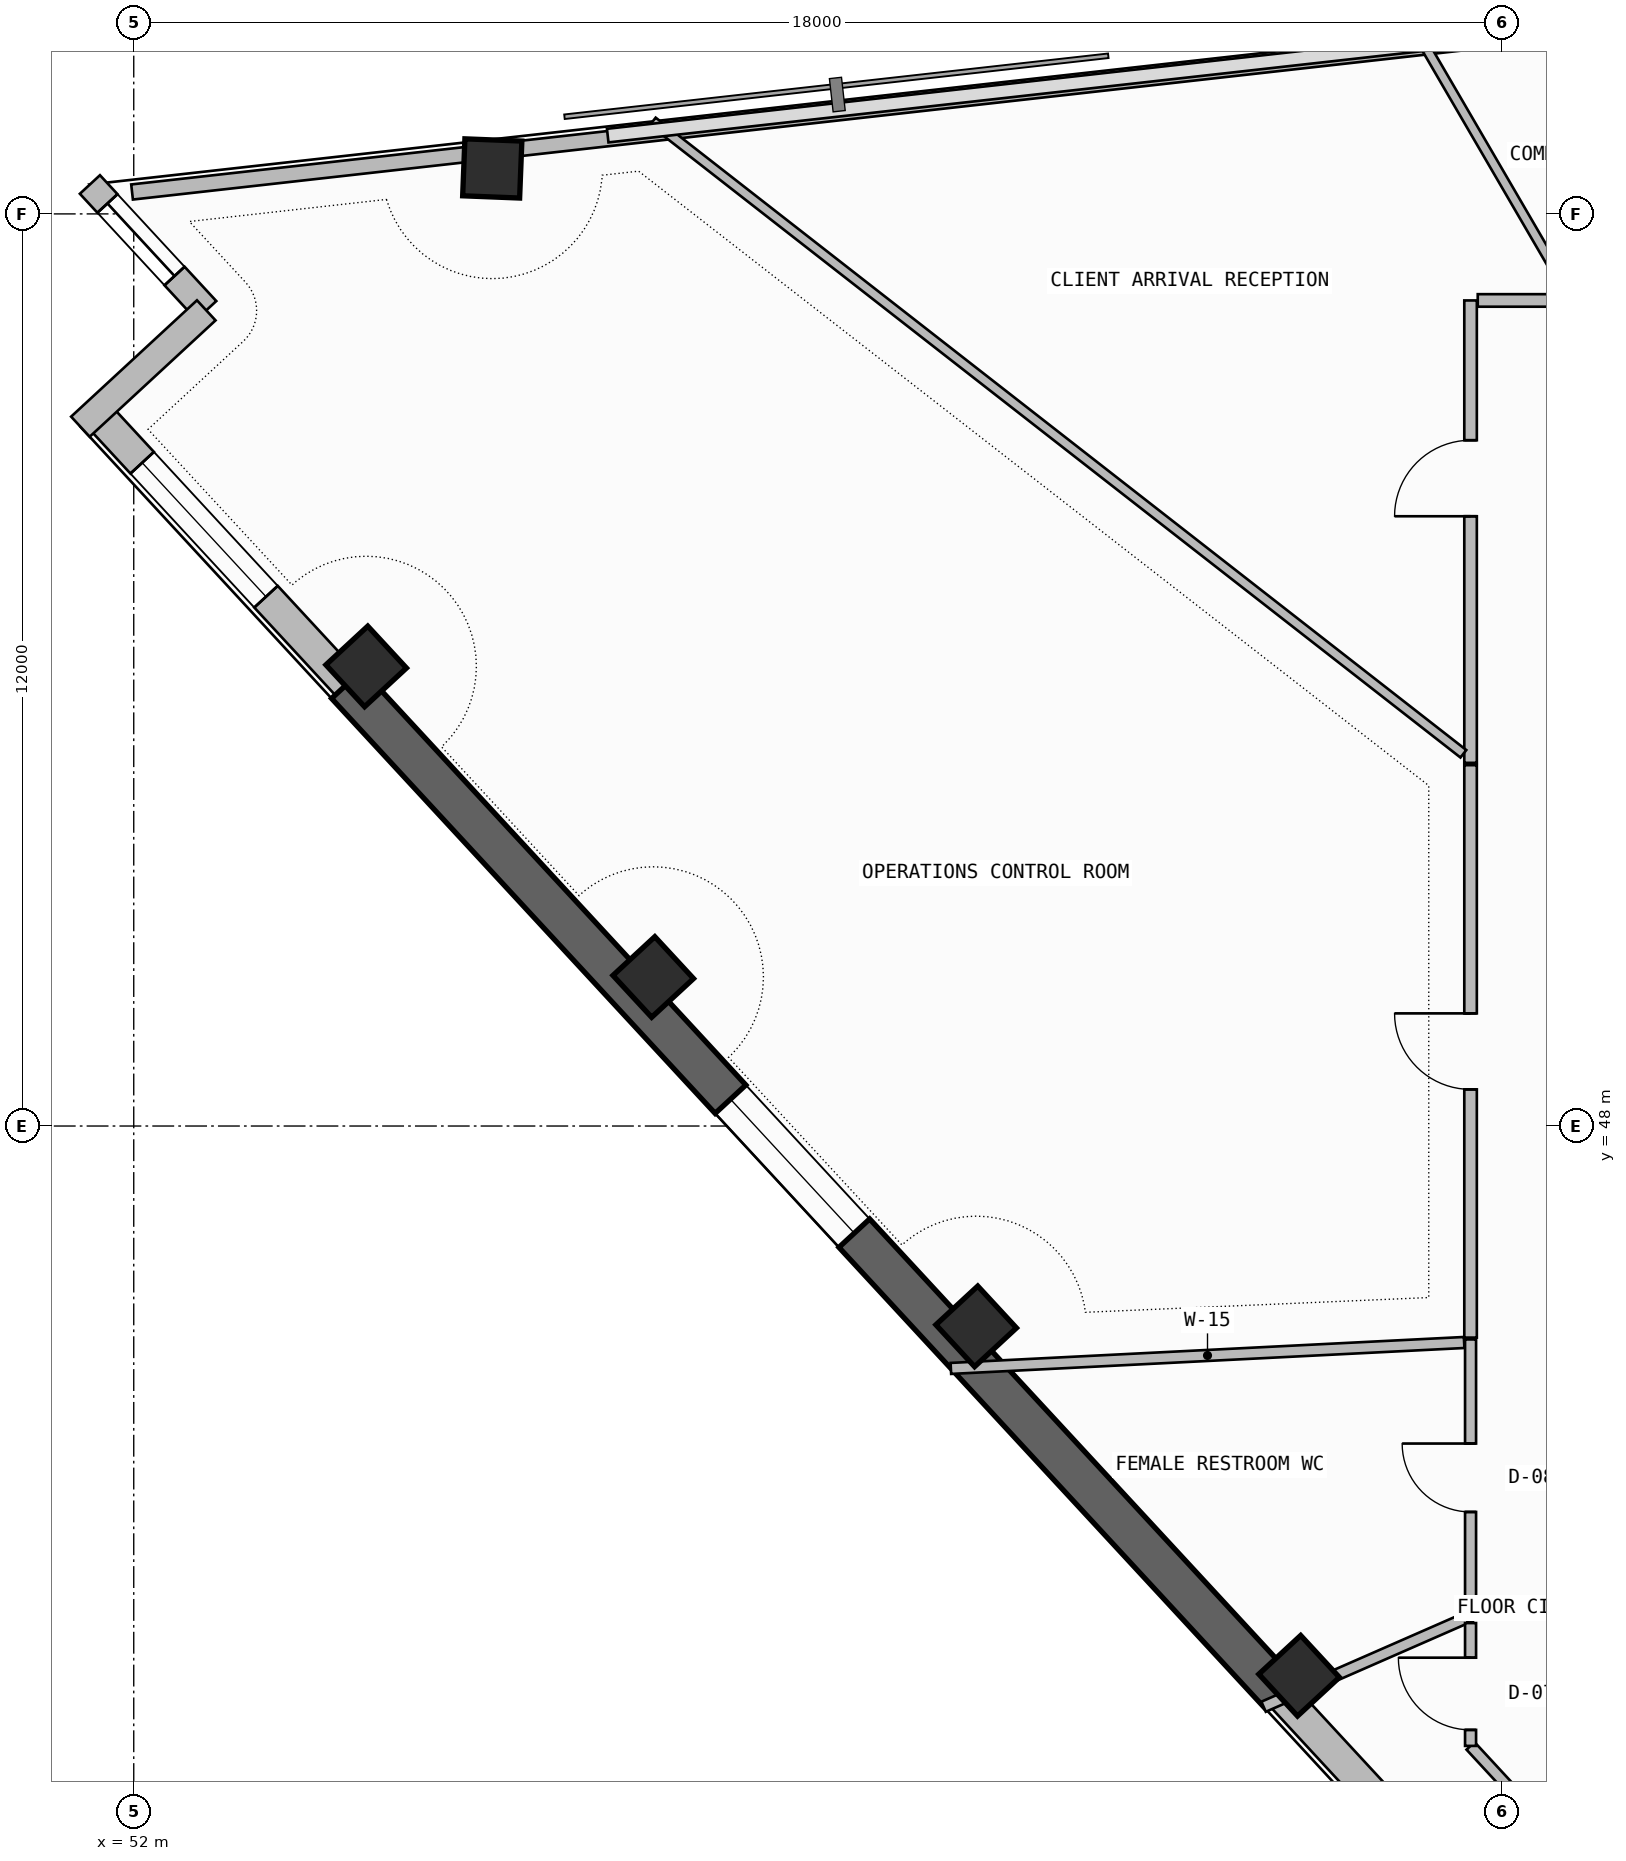
"""IFC4 building model, lengths in metres.
Left out: names, types, materials, properties, quantities, classifications, styles, units other than length and angle.
Written with IfcOpenShell. Run it as: python <this file> out.ifc"""

import sys

from ifc_helpers import new_model, si_unit, direction, frame, frame_2d, origin, origin_2d, place, context, subcontext, project, spatial, rectangle, extrude, element, fill, save


model = new_model("IFC4")
c1 = context("Model", 3, precision=1e-05, world=origin(), true_north=direction((0.0, 1.0)))
c2 = subcontext(c1, "Body", "Model", "MODEL_VIEW")
j1 = project(units=[si_unit("LENGTHUNIT", "METRE"), si_unit("PLANEANGLEUNIT", "RADIAN")], contexts=[c1])
p1 = place(None, origin())
s1 = spatial("IfcSite", under=j1, at=p1, CompositionType="ELEMENT")
p2 = place(p1, origin())
s2 = spatial("IfcBuilding", under=s1, at=p2, CompositionType="ELEMENT")
p3 = place(p2, frame((0.0, 0.0, 278.34)))
s3 = spatial("IfcBuildingStorey", under=s2, at=p3, CompositionType="ELEMENT", Elevation=278.34)
for number, where, z_axis, x_axis in (
    (1, (56.717, 60.598, 0.0), (0.0, 0.0, 1.0), (0.039, 0.999, 0.0)),
    (2, (55.058, 54.046, 0.0), (0.0, 0.0, 1.0), (-0.679, 0.734, 0.0)),
    (3, (58.835, 49.961, 0.0), (0.0, 0.0, 1.0), (-0.679, 0.734, 0.0)),
    (4, (63.084, 45.364, 0.0), (0.0, 0.0, 1.0), (-0.679, 0.734, 0.0)),
    (5, (67.333, 40.768, 0.0), (0.0, 0.0, 1.0), (-0.679, 0.734, 0.0)),
):
    element("IfcColumn", number, at=place(p3, frame(where, z_axis=z_axis, x_axis=x_axis)), inside=s3, PredefinedType="COLUMN", context=c2, shape_type="SweptSolid", body=[
        extrude(rectangle(XDim=0.75, YDim=0.75, at=origin_2d()), origin(), (0.0, 0.0, 1.0), 3.52),
    ])
p4 = place(p3, frame((51.5, 57.387, 0.0), z_axis=(0.0, 0.0, 1.0), x_axis=(0.67880684669, -0.734316869537, 0.0)))
e6 = element("IfcWall", 6, at=p4, inside=s3, PredefinedType="SOLIDWALL", context=c2, shape_type="SweptSolid", body=[
    extrude(rectangle(XDim=4.869, YDim=0.42, at=frame_2d((2.434, 0.0))), origin(), (0.0, 0.0, 1.0), 2.645),
])
p5 = place(p4, frame((0.9, 0.0, 1.1)))
e7 = element("IfcOpeningElement", 7, at=p5, cuts=e6, PredefinedType="OPENING", context=c2, shape_type="SweptSolid", body=[
    extrude(rectangle(XDim=2.4, YDim=1.2, at=frame_2d((1.2, 0.6))), frame((0.0, 0.22, 0.0), z_axis=(0.0, -1.0, 0.0), x_axis=(1.0, 0.0, 0.0)), (0.0, 0.0, 1.0), 0.44),
])
p6 = place(p3, frame((54.805, 53.812, -0.26), z_axis=(0.0, 0.0, 1.0), x_axis=(0.678803115619, -0.734320318543, 0.0)))
e8 = element("IfcWall", 8, at=p6, inside=s3, PredefinedType="SHEAR", context=c2, shape_type="SweptSolid", body=[
    extrude(rectangle(XDim=18.083, YDim=0.55, at=frame_2d((9.042, 0.0))), origin(), (0.0, 0.0, 1.0), 3.52),
])
p7 = place(p6, frame((7.434, 0.0, 1.1)))
e9 = element("IfcOpeningElement", 9, at=p7, cuts=e8, PredefinedType="OPENING", context=c2, shape_type="SweptSolid", body=[
    extrude(rectangle(XDim=2.4, YDim=1.2, at=frame_2d((1.2, 0.6))), frame((0.0, 0.285, 0.0), z_axis=(0.0, -1.0, 0.0), x_axis=(1.0, 0.0, 0.0)), (0.0, 0.0, 1.0), 0.57),
])
p8 = place(p3, frame((67.08, 40.533, 0.0), z_axis=(0.0, 0.0, 1.0), x_axis=(0.678800006437, -0.734323192648, 0.0)))
e10 = element("IfcWall", 10, at=p8, inside=s3, PredefinedType="SOLIDWALL", context=c2, shape_type="SweptSolid", body=[
    extrude(rectangle(XDim=6.512, YDim=0.42, at=frame_2d((3.256, 0.0))), origin(), (0.0, 0.0, 1.0), 2.645),
])
p9 = place(p8, frame((2.129, 0.0, 1.1)))
e11 = element("IfcOpeningElement", 11, at=p9, cuts=e10, PredefinedType="OPENING", context=c2, shape_type="SweptSolid", body=[
    extrude(rectangle(XDim=2.4, YDim=1.2, at=frame_2d((1.2, 0.6))), frame((0.0, 0.22, 0.0), z_axis=(0.0, -1.0, 0.0), x_axis=(1.0, 0.0, 0.0)), (0.0, 0.0, 1.0), 0.44),
])
p10 = place(p3, frame((51.423, 60.387, 0.0), z_axis=(0.0, 0.0, 1.0), x_axis=(0.678792531533, -0.734330102294, 0.0)))
e12 = element("IfcWall", 12, at=p10, inside=s3, PredefinedType="SOLIDWALL", context=c2, shape_type="SweptSolid", body=[
    extrude(rectangle(XDim=2.255, YDim=0.36, at=frame_2d((1.127, 0.0))), origin(), (0.0, 0.0, 1.0), 3.26),
])
p11 = place(p10, frame((0.34, 0.0, 0.45)))
e13 = element("IfcOpeningElement", 13, at=p11, cuts=e12, PredefinedType="OPENING", context=c2, shape_type="SweptSolid", body=[
    extrude(rectangle(XDim=1.3, YDim=2.4, at=frame_2d((0.65, 1.2))), frame((0.0, 0.19, 0.0), z_axis=(0.0, -1.0, 0.0), x_axis=(1.0, 0.0, 0.0)), (0.0, 0.0, 1.0), 0.38),
])
p12 = place(p3, frame((52.954, 58.731, 0.0), z_axis=(0.0, 0.0, 1.0), x_axis=(-0.734330102294, -0.678792531533, 0.0)))
e14 = element("IfcWall", 14, at=p12, inside=s3, PredefinedType="SOLIDWALL", context=c2, shape_type="SweptSolid", body=[
    extrude(rectangle(XDim=2.255, YDim=0.36, at=frame_2d((1.127, 0.0))), origin(), (0.0, 0.0, 1.0), 3.26),
])
p13 = place(p3, frame((81.557, 63.604, 0.0), z_axis=(0.0, 0.0, 1.0), x_axis=(-0.993776455024, -0.111392806945, 0.0)))
e15 = element("IfcWall", 15, at=p13, inside=s3, PredefinedType="PARAPET", context=c2, shape_type="SweptSolid", body=[
    extrude(rectangle(XDim=24.891, YDim=0.2, at=frame_2d((12.446, 0.0))), origin(), (0.0, 0.0, 1.0), 1.15),
])
p14 = place(p3, frame((56.565, 60.802, 0.0), z_axis=(0.0, 0.0, 1.0), x_axis=(-0.99377164586, -0.111435702918, 0.0)))
e16 = element("IfcWall", 16, at=p14, inside=s3, PredefinedType="PARAPET", context=c2, shape_type="SweptSolid", body=[
    extrude(rectangle(XDim=4.616, YDim=0.2, at=frame_2d((2.308, 0.0))), origin(), (0.0, 0.0, 1.0), 1.15),
])
p15 = place(p3, frame((69.589, 45.192, 0.0), z_axis=(0.0, 0.0, 1.0), x_axis=(0.0, -1.0, 0.0)))
e17 = element("IfcWall", 17, at=p15, inside=s3, PredefinedType="PARTITIONING", context=c2, shape_type="SweptSolid", body=[
    extrude(rectangle(XDim=3.639, YDim=0.145, at=frame_2d((1.82, 0.0))), origin(), (0.0, 0.0, 1.0), 3.26),
])
p16 = place(p15, frame((1.37, 0.0, 0.0)))
e18 = element("IfcOpeningElement", 18, at=p16, cuts=e17, PredefinedType="OPENING", context=c2, shape_type="SweptSolid", body=[
    extrude(rectangle(XDim=0.9, YDim=2.1, at=frame_2d((0.45, 1.05))), frame((0.0, 0.083, 0.0), z_axis=(0.0, -1.0, 0.0), x_axis=(1.0, 0.0, 0.0)), (0.0, 0.0, 1.0), 0.165),
])
p17 = place(p3, frame((69.589, 41.553, 0.0), z_axis=(0.0, 0.0, 1.0), x_axis=(-0.915644030191, -0.401990062035, 0.0)))
e19 = element("IfcWall", 19, at=p17, inside=s3, PredefinedType="PARTITIONING", context=c2, shape_type="SweptSolid", body=[
    extrude(rectangle(XDim=0.066, YDim=0.145, at=frame_2d((0.033, 0.0))), origin(), (0.0, 0.0, 1.0), 3.26),
])
p18 = place(p3, frame((69.529, 41.527, 0.0), z_axis=(0.0, 0.0, 1.0), x_axis=(-0.915979937863, -0.401224068859, 0.0)))
e20 = element("IfcWall", 20, at=p18, inside=s3, PredefinedType="PARTITIONING", context=c2, shape_type="SweptSolid", body=[
    extrude(rectangle(XDim=2.907, YDim=0.145, at=frame_2d((1.454, 0.0))), origin(), (0.0, 0.0, 1.0), 2.645),
])
p19 = place(p3, frame((62.751, 44.811, 0.0), z_axis=(0.0, 0.0, 1.0), x_axis=(0.998725271885, 0.050476046784, 0.0)))
e21 = element("IfcWall", 21, at=p19, inside=s3, PredefinedType="PARTITIONING", context=c2, shape_type="SweptSolid", body=[
    extrude(rectangle(XDim=6.762, YDim=0.145, at=frame_2d((3.381, 0.0))), origin(), (0.0, 0.0, 1.0), 2.645),
])
p20 = place(p3, frame((69.589, 39.845, 0.0), z_axis=(0.0, 0.0, 1.0), x_axis=(0.678830953326, -0.734294584487, 0.0)))
e22 = element("IfcWall", 22, at=p20, inside=s3, PredefinedType="PARTITIONING", context=c2, shape_type="SweptSolid", body=[
    extrude(rectangle(XDim=2.448, YDim=0.145, at=frame_2d((1.224, 0.0))), origin(), (0.0, 0.0, 1.0), 3.26),
])
p21 = place(p3, frame((69.589, 41.461, 0.0), z_axis=(0.0, 0.0, 1.0), x_axis=(0.0, -1.0, 0.0)))
e23 = element("IfcWall", 23, at=p21, inside=s3, PredefinedType="PARTITIONING", context=c2, shape_type="SweptSolid", body=[
    extrude(rectangle(XDim=1.616, YDim=0.145, at=frame_2d((0.808, 0.0))), origin(), (0.0, 0.0, 1.0), 3.26),
])
p22 = place(p21, frame((0.455, 0.0, 0.0)))
e24 = element("IfcOpeningElement", 24, at=p22, cuts=e23, PredefinedType="OPENING", context=c2, shape_type="SweptSolid", body=[
    extrude(rectangle(XDim=0.95, YDim=2.15, at=frame_2d((0.475, 1.075))), frame((0.0, 0.083, 0.0), z_axis=(0.0, -1.0, 0.0), x_axis=(1.0, 0.0, 0.0)), (0.0, 0.0, 1.0), 0.165),
])
p23 = place(p3, frame((70.907, 58.916, 0.0), z_axis=(0.0, 0.0, 1.0), x_axis=(-0.503247693996, 0.864142209644, 0.0)))
e25 = element("IfcWall", 25, at=p23, inside=s3, PredefinedType="PARTITIONING", context=c2, shape_type="SweptSolid", body=[
    extrude(rectangle(XDim=3.97, YDim=0.125, at=frame_2d((1.985, 0.0))), origin(), (0.0, 0.0, 1.0), 3.26),
])
p24 = place(p3, frame((69.589, 58.861, 0.0), z_axis=(0.0, 0.0, 1.0), x_axis=(0.0, -1.0, 0.0)))
e26 = element("IfcWall", 26, at=p24, inside=s3, PredefinedType="PARTITIONING", context=c2, shape_type="SweptSolid", body=[
    extrude(rectangle(XDim=6.083, YDim=0.165, at=frame_2d((3.042, 0.0))), origin(), (0.0, 0.0, 1.0), 2.745),
])
p25 = place(p24, frame((1.839, 0.0, 0.0)))
e27 = element("IfcOpeningElement", 27, at=p25, cuts=e26, PredefinedType="OPENING", context=c2, shape_type="SweptSolid", body=[
    extrude(rectangle(XDim=1.0, YDim=2.2, at=frame_2d((0.5, 1.1))), frame((0.0, 0.093, 0.0), z_axis=(0.0, -1.0, 0.0), x_axis=(1.0, 0.0, 0.0)), (0.0, 0.0, 1.0), 0.185),
])
p26 = place(p3, frame((70.879, 58.861, 0.0), z_axis=(0.0, 0.0, 1.0), x_axis=(-1.0, 0.0, 0.0)))
e28 = element("IfcWall", 28, at=p26, inside=s3, PredefinedType="PARTITIONING", context=c2, shape_type="SweptSolid", body=[
    extrude(rectangle(XDim=1.196, YDim=0.165, at=frame_2d((0.598, 0.0))), origin(), (0.0, 0.0, 1.0), 3.26),
])
p27 = place(p3, frame((69.494, 52.897, 0.0), z_axis=(0.0, 0.0, 1.0), x_axis=(-0.788467994184, 0.615075785694, 0.0)))
e29 = element("IfcWall", 29, at=p27, inside=s3, PredefinedType="PARTITIONING", context=c2, shape_type="SweptSolid", body=[
    extrude(rectangle(XDim=13.527, YDim=0.125, at=frame_2d((6.763, 0.0))), origin(), (0.0, 0.0, 1.0), 2.745),
])
p28 = place(p3, frame((69.589, 52.748, 0.0), z_axis=(0.0, 0.0, 1.0), x_axis=(0.0, -1.0, 0.0)))
e30 = element("IfcWall", 30, at=p28, inside=s3, PredefinedType="PARTITIONING", context=c2, shape_type="SweptSolid", body=[
    extrude(rectangle(XDim=7.531, YDim=0.165, at=frame_2d((3.766, 0.0))), origin(), (0.0, 0.0, 1.0), 2.745),
])
p29 = place(p28, frame((3.266, 0.0, 0.0)))
e31 = element("IfcOpeningElement", 31, at=p29, cuts=e30, PredefinedType="OPENING", context=c2, shape_type="SweptSolid", body=[
    extrude(rectangle(XDim=1.0, YDim=2.2, at=frame_2d((0.5, 1.1))), frame((0.0, 0.093, 0.0), z_axis=(0.0, -1.0, 0.0), x_axis=(1.0, 0.0, 0.0)), (0.0, 0.0, 1.0), 0.185),
])
p30 = place(p5, origin())
e32 = element("IfcWindow", 32, at=p30, inside=s3, PartitioningType="SINGLE_PANEL", PredefinedType="WINDOW", context=c2, shape_type="SweptSolid", body=[
    extrude(rectangle(XDim=2.4, YDim=1.2, at=frame_2d((1.2, 0.6))), frame((0.0, 0.03, 0.0), z_axis=(0.0, -1.0, 0.0), x_axis=(1.0, 0.0, 0.0)), (0.0, 0.0, 1.0), 0.06),
])
fill(e7, e32)
p31 = place(p7, origin())
e33 = element("IfcWindow", 33, at=p31, inside=s3, PartitioningType="SINGLE_PANEL", PredefinedType="WINDOW", context=c2, shape_type="SweptSolid", body=[
    extrude(rectangle(XDim=2.4, YDim=1.2, at=frame_2d((1.2, 0.6))), frame((0.0, 0.03, 0.0), z_axis=(0.0, -1.0, 0.0), x_axis=(1.0, 0.0, 0.0)), (0.0, 0.0, 1.0), 0.06),
])
fill(e9, e33)
p32 = place(p11, origin())
e34 = element("IfcWindow", 34, at=p32, inside=s3, PartitioningType="SINGLE_PANEL", PredefinedType="WINDOW", context=c2, shape_type="SweptSolid", body=[
    extrude(rectangle(XDim=1.3, YDim=2.4, at=frame_2d((0.65, 1.2))), frame((0.0, 0.03, 0.0), z_axis=(0.0, -1.0, 0.0), x_axis=(1.0, 0.0, 0.0)), (0.0, 0.0, 1.0), 0.06),
])
fill(e13, e34)
p33 = place(p16, frame((0.9, 0.0, 0.0), z_axis=(0.0, 0.0, 1.0), x_axis=(-1.0, 0.0, 0.0)))
e35 = element("IfcDoor", 35, at=p33, inside=s3, OperationType="SINGLE_SWING_RIGHT", PredefinedType="DOOR", context=c2, shape_type="SweptSolid", body=[
    extrude(rectangle(XDim=0.9, YDim=2.1, at=frame_2d((0.45, 1.05))), frame((0.0, 0.025, 0.0), z_axis=(0.0, -1.0, 0.0), x_axis=(1.0, 0.0, 0.0)), (0.0, 0.0, 1.0), 0.05),
])
fill(e18, e35)
p34 = place(p22, frame((0.95, 0.0, 0.0), z_axis=(0.0, 0.0, 1.0), x_axis=(-1.0, 0.0, 0.0)))
e36 = element("IfcDoor", 36, at=p34, inside=s3, OperationType="SINGLE_SWING_RIGHT", PredefinedType="DOOR", context=c2, shape_type="SweptSolid", body=[
    extrude(rectangle(XDim=0.95, YDim=2.15, at=frame_2d((0.475, 1.075))), frame((0.0, 0.025, 0.0), z_axis=(0.0, -1.0, 0.0), x_axis=(1.0, 0.0, 0.0)), (0.0, 0.0, 1.0), 0.05),
])
fill(e24, e36)
p35 = place(p25, frame((1.0, 0.0, 0.0), z_axis=(0.0, 0.0, 1.0), x_axis=(-1.0, 0.0, 0.0)))
e37 = element("IfcDoor", 37, at=p35, inside=s3, OperationType="SINGLE_SWING_LEFT", PredefinedType="DOOR", context=c2, shape_type="SweptSolid", body=[
    extrude(rectangle(XDim=1.0, YDim=2.2, at=frame_2d((0.5, 1.1))), frame((0.0, 0.025, 0.0), z_axis=(0.0, -1.0, 0.0), x_axis=(1.0, 0.0, 0.0)), (0.0, 0.0, 1.0), 0.05),
])
fill(e27, e37)
p36 = place(p29, frame((1.0, 0.0, 0.0), z_axis=(0.0, 0.0, 1.0), x_axis=(-1.0, 0.0, 0.0)))
e38 = element("IfcDoor", 38, at=p36, inside=s3, OperationType="SINGLE_SWING_RIGHT", PredefinedType="DOOR", context=c2, shape_type="SweptSolid", body=[
    extrude(rectangle(XDim=1.0, YDim=2.2, at=frame_2d((0.5, 1.1))), frame((0.0, 0.025, 0.0), z_axis=(0.0, -1.0, 0.0), x_axis=(1.0, 0.0, 0.0)), (0.0, 0.0, 1.0), 0.05),
])
fill(e31, e38)
save(model, sys.argv[1])
